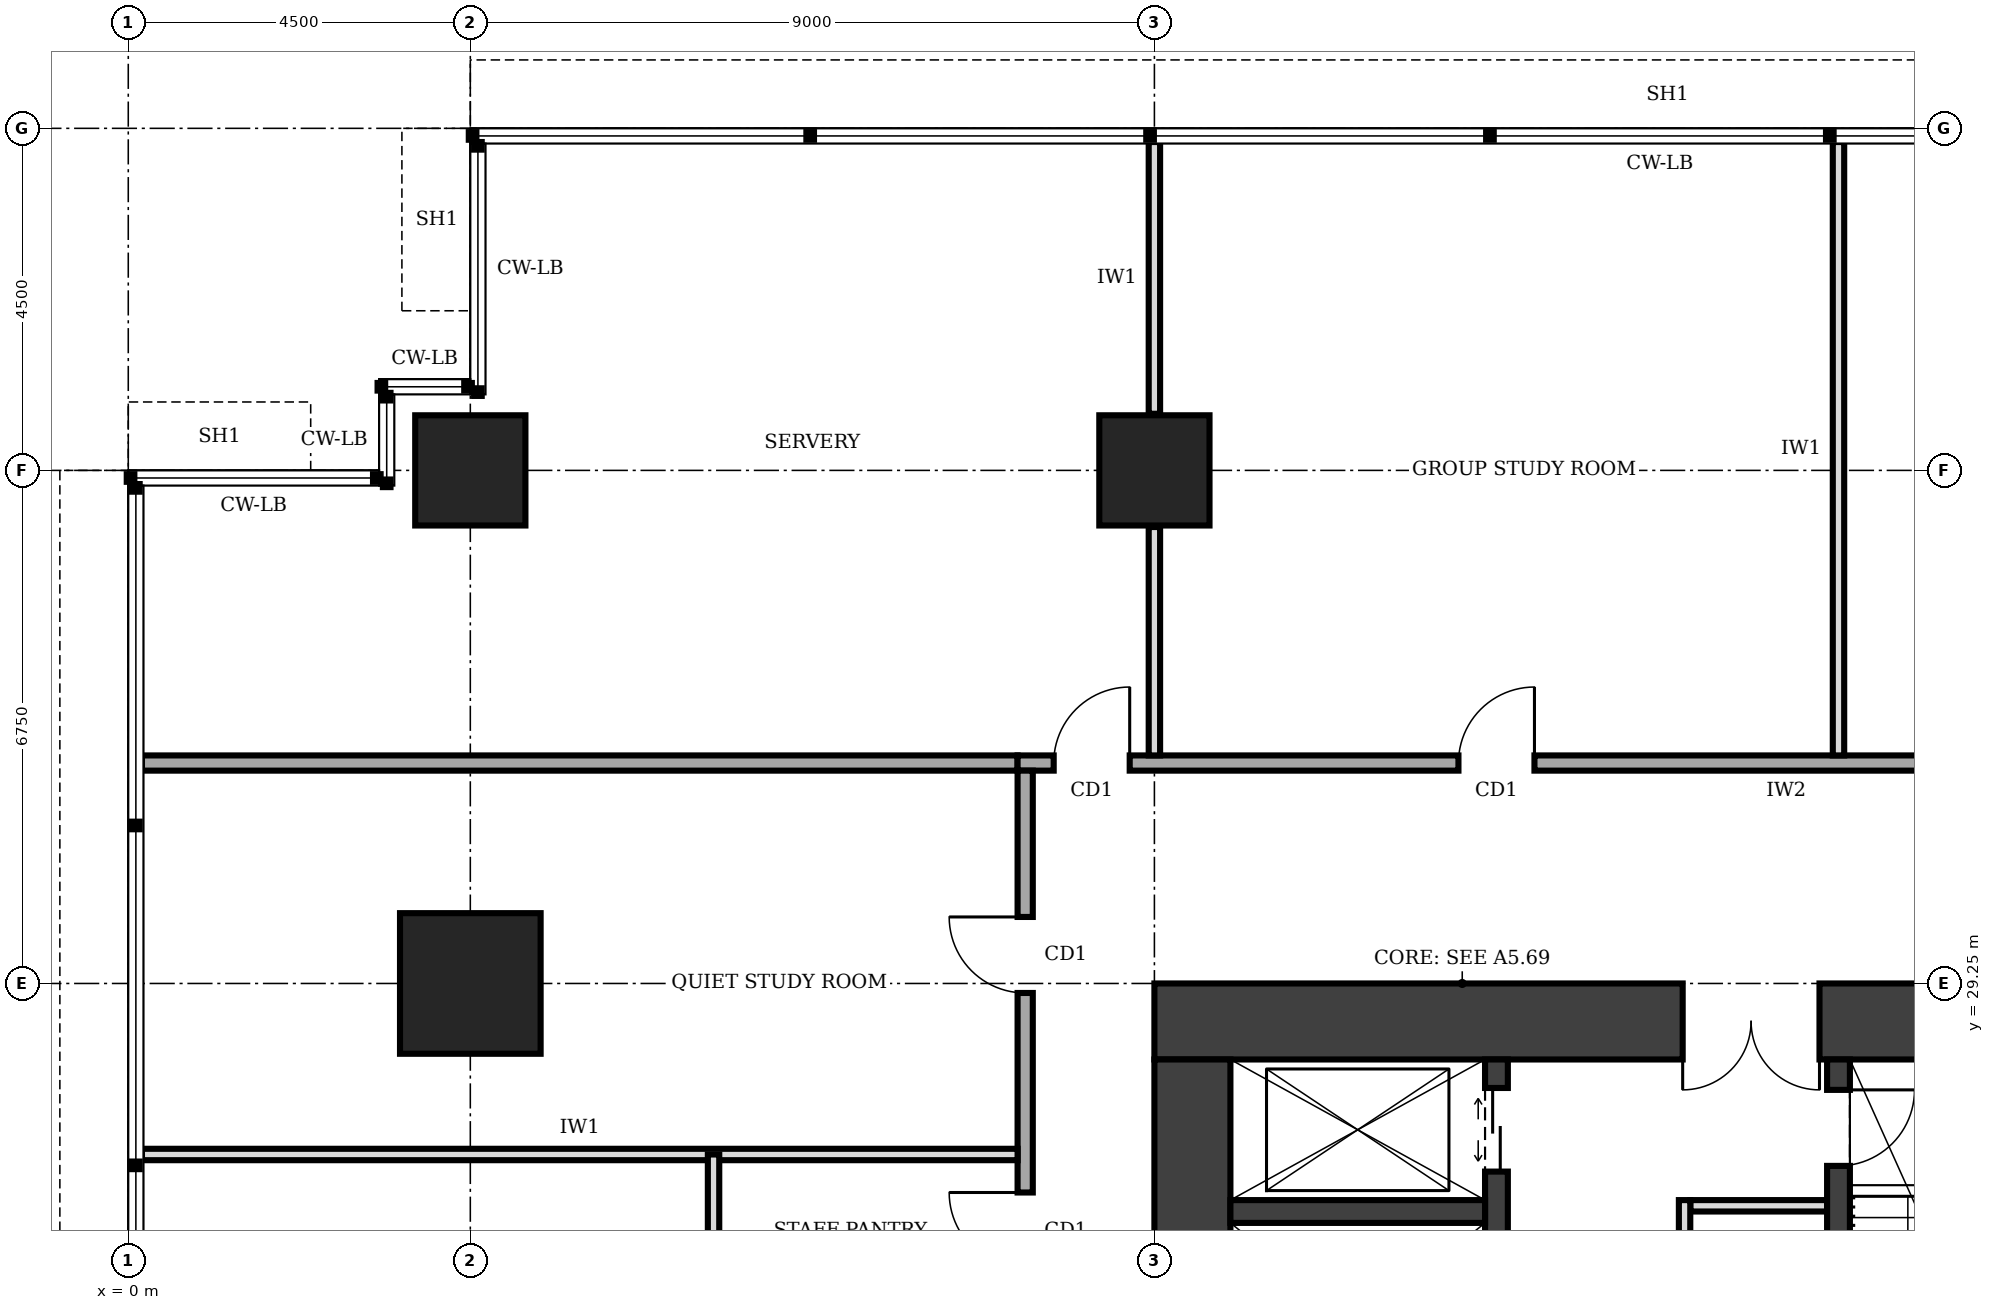
"""IFC4 building model, lengths in metres.
Left out: names, types, materials, properties, quantities, classifications, styles, units other than length and angle.
Written with IfcOpenShell. Run it as: python <this file> out.ifc"""

import sys

from ifc_helpers import new_model, si_unit, direction, frame, frame_2d, origin, origin_2d, place, context, subcontext, project, spatial, rectangle, extrude, element, fill, save


model = new_model("IFC4")
c1 = context("Model", 3, precision=1e-05, world=origin(), true_north=direction((0.0, 1.0)))
c2 = subcontext(c1, "Body", "Model", "MODEL_VIEW")
j1 = project(units=[si_unit("LENGTHUNIT", "METRE"), si_unit("PLANEANGLEUNIT", "RADIAN")], contexts=[c1])
p1 = place(None, origin())
s1 = spatial("IfcSite", under=j1, at=p1, CompositionType="ELEMENT")
p2 = place(p1, origin())
s2 = spatial("IfcBuilding", under=s1, at=p2, CompositionType="ELEMENT")
p3 = place(p2, frame((0.0, 0.0, 269.0)))
s3 = spatial("IfcBuildingStorey", under=s2, at=p3, CompositionType="ELEMENT", Elevation=269.0)
p4 = place(p3, frame((27.0, 28.75, 0.0), z_axis=(0.0, 0.0, 1.0), x_axis=(-1.0, 0.0, 0.0)))
e1 = element("IfcWall", 1, at=p4, inside=s3, PredefinedType="SHEAR", context=c2, shape_type="SweptSolid", body=[
    extrude(rectangle(XDim=13.5, YDim=1.0, at=frame_2d((6.75, 0.0))), origin(), (0.0, 0.0, 1.0), 4.0),
])
p5 = place(p4, frame((4.75, 0.0, 0.0)))
e2 = element("IfcOpeningElement", 2, at=p5, cuts=e1, PredefinedType="OPENING", context=c2, shape_type="SweptSolid", body=[
    extrude(rectangle(XDim=1.8, YDim=2.1, at=frame_2d((0.9, 1.05))), frame((0.0, 0.51, 0.0), z_axis=(0.0, -1.0, 0.0), x_axis=(1.0, 0.0, 0.0)), (0.0, 0.0, 1.0), 1.02),
])
p6 = place(p3, frame((14.0, 28.25, 0.0), z_axis=(0.0, 0.0, 1.0), x_axis=(0.0, -1.0, 0.0)))
e3 = element("IfcWall", 3, at=p6, inside=s3, PredefinedType="SHEAR", context=c2, shape_type="SweptSolid", body=[
    extrude(rectangle(XDim=16.0, YDim=1.0, at=frame_2d((8.0, 0.0))), origin(), (0.0, 0.0, 1.0), 4.0),
])
p7 = place(p3, frame((18.0, 12.25, 0.0), z_axis=(0.0, 0.0, 1.0), x_axis=(0.0, 1.0, 0.0)))
e4 = element("IfcWall", 4, at=p7, inside=s3, PredefinedType="SHEAR", context=c2, shape_type="SweptSolid", body=[
    extrude(rectangle(XDim=16.0, YDim=0.3, at=frame_2d((8.0, 0.0))), origin(), (0.0, 0.0, 1.0), 4.0),
])
p8 = place(p7, frame((0.4, 0.0, 0.0)))
e5 = element("IfcOpeningElement", 5, at=p8, cuts=e4, PredefinedType="OPENING", context=c2, shape_type="SweptSolid", body=[
    extrude(rectangle(XDim=1.0, YDim=2.1, at=frame_2d((0.5, 1.05))), frame((0.0, 0.16, 0.0), z_axis=(0.0, -1.0, 0.0), x_axis=(1.0, 0.0, 0.0)), (0.0, 0.0, 1.0), 0.32),
])
p9 = place(p7, frame((14.525, 0.0, 0.0)))
e6 = element("IfcOpeningElement", 6, at=p9, cuts=e4, PredefinedType="OPENING", context=c2, shape_type="SweptSolid", body=[
    extrude(rectangle(XDim=1.1, YDim=2.1, at=frame_2d((0.55, 1.05))), frame((0.0, 0.16, 0.0), z_axis=(0.0, -1.0, 0.0), x_axis=(1.0, 0.0, 0.0)), (0.0, 0.0, 1.0), 0.32),
])
p10 = place(p7, frame((9.0, 0.0, 0.0)))
e7 = element("IfcOpeningElement", 7, at=p10, cuts=e4, PredefinedType="OPENING", context=c2, shape_type="SweptSolid", body=[
    extrude(rectangle(XDim=1.0, YDim=2.1, at=frame_2d((0.5, 1.05))), frame((0.0, 0.16, 0.0), z_axis=(0.0, -1.0, 0.0), x_axis=(1.0, 0.0, 0.0)), (0.0, 0.0, 1.0), 0.32),
])
p11 = place(p7, frame((12.0, 0.0, 0.0)))
e8 = element("IfcOpeningElement", 8, at=p11, cuts=e4, PredefinedType="OPENING", context=c2, shape_type="SweptSolid", body=[
    extrude(rectangle(XDim=1.0, YDim=2.1, at=frame_2d((0.5, 1.05))), frame((0.0, 0.16, 0.0), z_axis=(0.0, -1.0, 0.0), x_axis=(1.0, 0.0, 0.0)), (0.0, 0.0, 1.0), 0.32),
])
p12 = place(p3, frame((22.5, 12.25, 0.0), z_axis=(0.0, 0.0, 1.0), x_axis=(0.0, 1.0, 0.0)))
e9 = element("IfcWall", 9, at=p12, inside=s3, PredefinedType="SHEAR", context=c2, shape_type="SweptSolid", body=[
    extrude(rectangle(XDim=16.0, YDim=0.3, at=frame_2d((8.0, 0.0))), origin(), (0.0, 0.0, 1.0), 4.0),
])
p13 = place(p12, frame((14.6, 0.0, 0.0)))
e10 = element("IfcOpeningElement", 10, at=p13, cuts=e9, PredefinedType="OPENING", context=c2, shape_type="SweptSolid", body=[
    extrude(rectangle(XDim=1.0, YDim=2.1, at=frame_2d((0.5, 1.05))), frame((0.0, 0.16, 0.0), z_axis=(0.0, -1.0, 0.0), x_axis=(1.0, 0.0, 0.0)), (0.0, 0.0, 1.0), 0.32),
])
p14 = place(p12, frame((0.375, 0.0, 0.0)))
e11 = element("IfcOpeningElement", 11, at=p14, cuts=e9, PredefinedType="OPENING", context=c2, shape_type="SweptSolid", body=[
    extrude(rectangle(XDim=1.1, YDim=2.1, at=frame_2d((0.55, 1.05))), frame((0.0, 0.16, 0.0), z_axis=(0.0, -1.0, 0.0), x_axis=(1.0, 0.0, 0.0)), (0.0, 0.0, 1.0), 0.32),
])
p15 = place(p12, frame((3.7, 0.0, 0.0)))
e12 = element("IfcOpeningElement", 12, at=p15, cuts=e9, PredefinedType="OPENING", context=c2, shape_type="SweptSolid", body=[
    extrude(rectangle(XDim=1.1, YDim=2.1, at=frame_2d((0.55, 1.05))), frame((0.0, 0.16, 0.0), z_axis=(0.0, -1.0, 0.0), x_axis=(1.0, 0.0, 0.0)), (0.0, 0.0, 1.0), 0.32),
])
p16 = place(p12, frame((5.95, 0.0, 0.0)))
e13 = element("IfcOpeningElement", 13, at=p16, cuts=e9, PredefinedType="OPENING", context=c2, shape_type="SweptSolid", body=[
    extrude(rectangle(XDim=1.1, YDim=2.1, at=frame_2d((0.55, 1.05))), frame((0.0, 0.16, 0.0), z_axis=(0.0, -1.0, 0.0), x_axis=(1.0, 0.0, 0.0)), (0.0, 0.0, 1.0), 0.32),
])
p17 = place(p3, frame((14.5, 26.25, 0.0), z_axis=(0.0, 0.0, 1.0), x_axis=(1.0, 0.0, 0.0)))
e14 = element("IfcWall", 14, at=p17, inside=s3, PredefinedType="SHEAR", context=c2, shape_type="SweptSolid", body=[
    extrude(rectangle(XDim=3.35, YDim=0.3, at=frame_2d((1.675, 0.0))), origin(), (0.0, 0.0, 1.0), 4.0),
])
p18 = place(p3, frame((4.5, 29.25, 0.0), z_axis=(0.0, 0.0, 1.0), x_axis=(1.0, 0.0, 0.0)))
e15 = element("IfcColumn", 15, at=p18, inside=s3, PredefinedType="COLUMN", context=c2, shape_type="SweptSolid", body=[
    extrude(rectangle(XDim=1.85, YDim=1.85, at=origin_2d()), origin(), (0.0, 0.0, 1.0), 4.0),
])
for number, where, z_axis, x_axis in (
    (16, (4.5, 36.0, 0.0), (0.0, 0.0, 1.0), (1.0, 0.0, 0.0)),
    (17, (13.5, 36.0, 0.0), (0.0, 0.0, 1.0), (1.0, 0.0, 0.0)),
):
    element("IfcColumn", number, at=place(p3, frame(where, z_axis=z_axis, x_axis=x_axis)), inside=s3, PredefinedType="COLUMN", context=c2, shape_type="SweptSolid", body=[
        extrude(rectangle(XDim=1.45, YDim=1.45, at=origin_2d()), origin(), (0.0, 0.0, 1.0), 4.0),
    ])
p19 = place(p3, frame((20.475, 20.4, 0.0), z_axis=(0.0, 0.0, 1.0), x_axis=(0.0, 1.0, 0.0)))
e18 = element("IfcWall", 18, at=p19, inside=s3, PredefinedType="PARTITIONING", context=c2, shape_type="SweptSolid", body=[
    extrude(rectangle(XDim=6.0, YDim=0.15, at=frame_2d((3.0, 0.0))), origin(), (0.0, 0.0, 1.0), 3.75),
])
p20 = place(p19, frame((0.9, 0.0, 0.0)))
e19 = element("IfcOpeningElement", 19, at=p20, cuts=e18, PredefinedType="OPENING", context=c2, shape_type="SweptSolid", body=[
    extrude(rectangle(XDim=0.9, YDim=2.1, at=frame_2d((0.45, 1.05))), frame((0.0, 0.085, 0.0), z_axis=(0.0, -1.0, 0.0), x_axis=(1.0, 0.0, 0.0)), (0.0, 0.0, 1.0), 0.17),
])
p21 = place(p19, frame((3.825, 0.0, 0.0)))
e20 = element("IfcOpeningElement", 20, at=p21, cuts=e18, PredefinedType="OPENING", context=c2, shape_type="SweptSolid", body=[
    extrude(rectangle(XDim=0.9, YDim=2.1, at=frame_2d((0.45, 1.05))), frame((0.0, 0.085, 0.0), z_axis=(0.0, -1.0, 0.0), x_axis=(1.0, 0.0, 0.0)), (0.0, 0.0, 1.0), 0.17),
])
p22 = place(p3, frame((20.55, 26.325, 0.0), z_axis=(0.0, 0.0, 1.0), x_axis=(1.0, 0.0, 0.0)))
e21 = element("IfcWall", 21, at=p22, inside=s3, PredefinedType="PARTITIONING", context=c2, shape_type="SweptSolid", body=[
    extrude(rectangle(XDim=1.8, YDim=0.15, at=frame_2d((0.9, 0.0))), origin(), (0.0, 0.0, 1.0), 3.75),
])
p23 = place(p3, frame((29.35, 32.15, 0.0), z_axis=(0.0, 0.0, 1.0), x_axis=(-1.0, 0.0, 0.0)))
e22 = element("IfcWall", 22, at=p23, inside=s3, PredefinedType="SOLIDWALL", context=c2, shape_type="SweptSolid", body=[
    extrude(rectangle(XDim=17.65, YDim=0.2, at=frame_2d((8.825, 0.0))), origin(), (0.0, 0.0, 1.0), 3.75),
])
p24 = place(p23, frame((16.175, 0.0, 0.0)))
e23 = element("IfcOpeningElement", 23, at=p24, cuts=e22, PredefinedType="OPENING", context=c2, shape_type="SweptSolid", body=[
    extrude(rectangle(XDim=1.0, YDim=2.1, at=frame_2d((0.5, 1.05))), frame((0.0, 0.11, 0.0), z_axis=(0.0, -1.0, 0.0), x_axis=(1.0, 0.0, 0.0)), (0.0, 0.0, 1.0), 0.22),
])
p25 = place(p23, frame((10.85, 0.0, 0.0)))
e24 = element("IfcOpeningElement", 24, at=p25, cuts=e22, PredefinedType="OPENING", context=c2, shape_type="SweptSolid", body=[
    extrude(rectangle(XDim=1.0, YDim=2.1, at=frame_2d((0.5, 1.05))), frame((0.0, 0.11, 0.0), z_axis=(0.0, -1.0, 0.0), x_axis=(1.0, 0.0, 0.0)), (0.0, 0.0, 1.0), 0.22),
])
p26 = place(p23, frame((2.425, 0.0, 0.0)))
e25 = element("IfcOpeningElement", 25, at=p26, cuts=e22, PredefinedType="OPENING", context=c2, shape_type="SweptSolid", body=[
    extrude(rectangle(XDim=1.8, YDim=2.1, at=frame_2d((0.9, 1.05))), frame((0.0, 0.11, 0.0), z_axis=(0.0, -1.0, 0.0), x_axis=(1.0, 0.0, 0.0)), (0.0, 0.0, 1.0), 0.22),
])
p27 = place(p3, frame((11.8, 32.05, 0.0), z_axis=(0.0, 0.0, 1.0), x_axis=(0.0, -1.0, 0.0)))
e26 = element("IfcWall", 26, at=p27, inside=s3, PredefinedType="SOLIDWALL", context=c2, shape_type="SweptSolid", body=[
    extrude(rectangle(XDim=23.8, YDim=0.2, at=frame_2d((11.9, 0.0))), origin(), (0.0, 0.0, 1.0), 3.75),
])
p28 = place(p27, frame((20.675, 0.0, 0.0)))
e27 = element("IfcOpeningElement", 27, at=p28, cuts=e26, PredefinedType="OPENING", context=c2, shape_type="SweptSolid", body=[
    extrude(rectangle(XDim=1.0, YDim=2.1, at=frame_2d((0.5, 1.05))), frame((0.0, 0.11, 0.0), z_axis=(0.0, -1.0, 0.0), x_axis=(1.0, 0.0, 0.0)), (0.0, 0.0, 1.0), 0.22),
])
p29 = place(p27, frame((16.2, 0.0, 0.0)))
e28 = element("IfcOpeningElement", 28, at=p29, cuts=e26, PredefinedType="OPENING", context=c2, shape_type="SweptSolid", body=[
    extrude(rectangle(XDim=0.9, YDim=2.1, at=frame_2d((0.45, 1.05))), frame((0.0, 0.11, 0.0), z_axis=(0.0, -1.0, 0.0), x_axis=(1.0, 0.0, 0.0)), (0.0, 0.0, 1.0), 0.22),
])
p30 = place(p27, frame((13.2, 0.0, 0.0)))
e29 = element("IfcOpeningElement", 29, at=p30, cuts=e26, PredefinedType="OPENING", context=c2, shape_type="SweptSolid", body=[
    extrude(rectangle(XDim=0.9, YDim=2.1, at=frame_2d((0.45, 1.05))), frame((0.0, 0.11, 0.0), z_axis=(0.0, -1.0, 0.0), x_axis=(1.0, 0.0, 0.0)), (0.0, 0.0, 1.0), 0.22),
])
p31 = place(p27, frame((8.35, 0.0, 0.0)))
e30 = element("IfcOpeningElement", 30, at=p31, cuts=e26, PredefinedType="OPENING", context=c2, shape_type="SweptSolid", body=[
    extrude(rectangle(XDim=0.9, YDim=2.1, at=frame_2d((0.45, 1.05))), frame((0.0, 0.11, 0.0), z_axis=(0.0, -1.0, 0.0), x_axis=(1.0, 0.0, 0.0)), (0.0, 0.0, 1.0), 0.22),
])
p32 = place(p27, frame((5.55, 0.0, 0.0)))
e31 = element("IfcOpeningElement", 31, at=p32, cuts=e26, PredefinedType="OPENING", context=c2, shape_type="SweptSolid", body=[
    extrude(rectangle(XDim=1.0, YDim=2.1, at=frame_2d((0.5, 1.05))), frame((0.0, 0.11, 0.0), z_axis=(0.0, -1.0, 0.0), x_axis=(1.0, 0.0, 0.0)), (0.0, 0.0, 1.0), 0.22),
])
p33 = place(p27, frame((11.05, 0.0, 0.0)))
e32 = element("IfcOpeningElement", 32, at=p33, cuts=e26, PredefinedType="OPENING", context=c2, shape_type="SweptSolid", body=[
    extrude(rectangle(XDim=1.0, YDim=2.1, at=frame_2d((0.5, 1.05))), frame((0.0, 0.11, 0.0), z_axis=(0.0, -1.0, 0.0), x_axis=(1.0, 0.0, 0.0)), (0.0, 0.0, 1.0), 0.22),
])
p34 = place(p27, frame((1.925, 0.0, 0.0)))
e33 = element("IfcOpeningElement", 33, at=p34, cuts=e26, PredefinedType="OPENING", context=c2, shape_type="SweptSolid", body=[
    extrude(rectangle(XDim=1.0, YDim=2.1, at=frame_2d((0.5, 1.05))), frame((0.0, 0.11, 0.0), z_axis=(0.0, -1.0, 0.0), x_axis=(1.0, 0.0, 0.0)), (0.0, 0.0, 1.0), 0.22),
])
p35 = place(p3, frame((0.18, 32.15, 0.0), z_axis=(0.0, 0.0, 1.0), x_axis=(1.0, 0.0, 0.0)))
e34 = element("IfcWall", 34, at=p35, inside=s3, PredefinedType="SOLIDWALL", context=c2, shape_type="SweptSolid", body=[
    extrude(rectangle(XDim=11.52, YDim=0.2, at=frame_2d((5.76, 0.0))), origin(), (0.0, 0.0, 1.0), 3.75),
])
p36 = place(p3, frame((13.5, 32.25, 0.0), z_axis=(0.0, 0.0, 1.0), x_axis=(0.0, 1.0, 0.0)))
e35 = element("IfcWall", 35, at=p36, inside=s3, PredefinedType="PARTITIONING", context=c2, shape_type="SweptSolid", body=[
    extrude(rectangle(XDim=3.005, YDim=0.15, at=frame_2d((1.502, 0.0))), origin(), (0.0, 0.0, 1.0), 2.85),
])
p37 = place(p3, frame((13.5, 36.745, 0.0), z_axis=(0.0, 0.0, 1.0), x_axis=(0.0, 1.0, 0.0)))
e36 = element("IfcWall", 36, at=p37, inside=s3, PredefinedType="PARTITIONING", context=c2, shape_type="SweptSolid", body=[
    extrude(rectangle(XDim=3.575, YDim=0.15, at=frame_2d((1.788, 0.0))), origin(), (0.0, 0.0, 1.0), 2.85),
])
p38 = place(p3, frame((22.5, 32.25, 0.0), z_axis=(0.0, 0.0, 1.0), x_axis=(0.0, 1.0, 0.0)))
e37 = element("IfcWall", 37, at=p38, inside=s3, PredefinedType="PARTITIONING", context=c2, shape_type="SweptSolid", body=[
    extrude(rectangle(XDim=8.07, YDim=0.15, at=frame_2d((4.035, 0.0))), origin(), (0.0, 0.0, 1.0), 3.75),
])
p39 = place(p3, frame((0.18, 27.0, 0.0), z_axis=(0.0, 0.0, 1.0), x_axis=(1.0, 0.0, 0.0)))
e38 = element("IfcWall", 38, at=p39, inside=s3, PredefinedType="PARTITIONING", context=c2, shape_type="SweptSolid", body=[
    extrude(rectangle(XDim=11.52, YDim=0.15, at=frame_2d((5.76, 0.0))), origin(), (0.0, 0.0, 1.0), 3.75),
])
p40 = place(p3, frame((7.7, 25.0, 0.0), z_axis=(0.0, 0.0, 1.0), x_axis=(0.0, 1.0, 0.0)))
e39 = element("IfcWall", 39, at=p40, inside=s3, PredefinedType="PARTITIONING", context=c2, shape_type="SweptSolid", body=[
    extrude(rectangle(XDim=2.0, YDim=0.15, at=frame_2d((1.0, 0.0))), origin(), (0.0, 0.0, 1.0), 3.75),
])
p41 = place(p5, origin())
e40 = element("IfcDoor", 40, at=p41, inside=s3, OperationType="DOUBLE_DOOR_SINGLE_SWING", PredefinedType="DOOR", context=c2, shape_type="SweptSolid", body=[
    extrude(rectangle(XDim=1.8, YDim=2.1, at=frame_2d((0.9, 1.05))), frame((0.0, 0.025, 0.0), z_axis=(0.0, -1.0, 0.0), x_axis=(1.0, 0.0, 0.0)), (0.0, 0.0, 1.0), 0.05),
])
fill(e2, e40)
p42 = place(p13, frame((1.0, 0.0, 0.0), z_axis=(0.0, 0.0, 1.0), x_axis=(-1.0, 0.0, 0.0)))
e41 = element("IfcDoor", 41, at=p42, inside=s3, OperationType="SINGLE_SWING_LEFT", PredefinedType="DOOR", context=c2, shape_type="SweptSolid", body=[
    extrude(rectangle(XDim=1.0, YDim=2.1, at=frame_2d((0.5, 1.05))), frame((0.0, 0.025, 0.0), z_axis=(0.0, -1.0, 0.0), x_axis=(1.0, 0.0, 0.0)), (0.0, 0.0, 1.0), 0.05),
])
fill(e10, e41)
p43 = place(p9, origin())
e42 = element("IfcDoor", 42, at=p43, inside=s3, OperationType="DOUBLE_DOOR_SLIDING", PredefinedType="DOOR", context=c2, shape_type="SweptSolid", body=[
    extrude(rectangle(XDim=1.1, YDim=2.1, at=frame_2d((0.55, 1.05))), frame((0.0, 0.025, 0.0), z_axis=(0.0, -1.0, 0.0), x_axis=(1.0, 0.0, 0.0)), (0.0, 0.0, 1.0), 0.05),
])
fill(e6, e42)
p44 = place(p24, frame((1.0, 0.0, 0.0), z_axis=(0.0, 0.0, 1.0), x_axis=(-1.0, 0.0, 0.0)))
e43 = element("IfcDoor", 43, at=p44, inside=s3, OperationType="SINGLE_SWING_RIGHT", PredefinedType="DOOR", context=c2, shape_type="SweptSolid", body=[
    extrude(rectangle(XDim=1.0, YDim=2.1, at=frame_2d((0.5, 1.05))), frame((0.0, 0.025, 0.0), z_axis=(0.0, -1.0, 0.0), x_axis=(1.0, 0.0, 0.0)), (0.0, 0.0, 1.0), 0.05),
])
fill(e23, e43)
p45 = place(p25, frame((1.0, 0.0, 0.0), z_axis=(0.0, 0.0, 1.0), x_axis=(-1.0, 0.0, 0.0)))
e44 = element("IfcDoor", 44, at=p45, inside=s3, OperationType="SINGLE_SWING_RIGHT", PredefinedType="DOOR", context=c2, shape_type="SweptSolid", body=[
    extrude(rectangle(XDim=1.0, YDim=2.1, at=frame_2d((0.5, 1.05))), frame((0.0, 0.025, 0.0), z_axis=(0.0, -1.0, 0.0), x_axis=(1.0, 0.0, 0.0)), (0.0, 0.0, 1.0), 0.05),
])
fill(e24, e44)
p46 = place(p32, frame((1.0, 0.0, 0.0), z_axis=(0.0, 0.0, 1.0), x_axis=(-1.0, 0.0, 0.0)))
e45 = element("IfcDoor", 45, at=p46, inside=s3, OperationType="SINGLE_SWING_RIGHT", PredefinedType="DOOR", context=c2, shape_type="SweptSolid", body=[
    extrude(rectangle(XDim=1.0, YDim=2.1, at=frame_2d((0.5, 1.05))), frame((0.0, 0.025, 0.0), z_axis=(0.0, -1.0, 0.0), x_axis=(1.0, 0.0, 0.0)), (0.0, 0.0, 1.0), 0.05),
])
fill(e31, e45)
p47 = place(p34, frame((1.0, 0.0, 0.0), z_axis=(0.0, 0.0, 1.0), x_axis=(-1.0, 0.0, 0.0)))
e46 = element("IfcDoor", 46, at=p47, inside=s3, OperationType="SINGLE_SWING_RIGHT", PredefinedType="DOOR", context=c2, shape_type="SweptSolid", body=[
    extrude(rectangle(XDim=1.0, YDim=2.1, at=frame_2d((0.5, 1.05))), frame((0.0, 0.025, 0.0), z_axis=(0.0, -1.0, 0.0), x_axis=(1.0, 0.0, 0.0)), (0.0, 0.0, 1.0), 0.05),
])
fill(e33, e46)
save(model, sys.argv[1])
